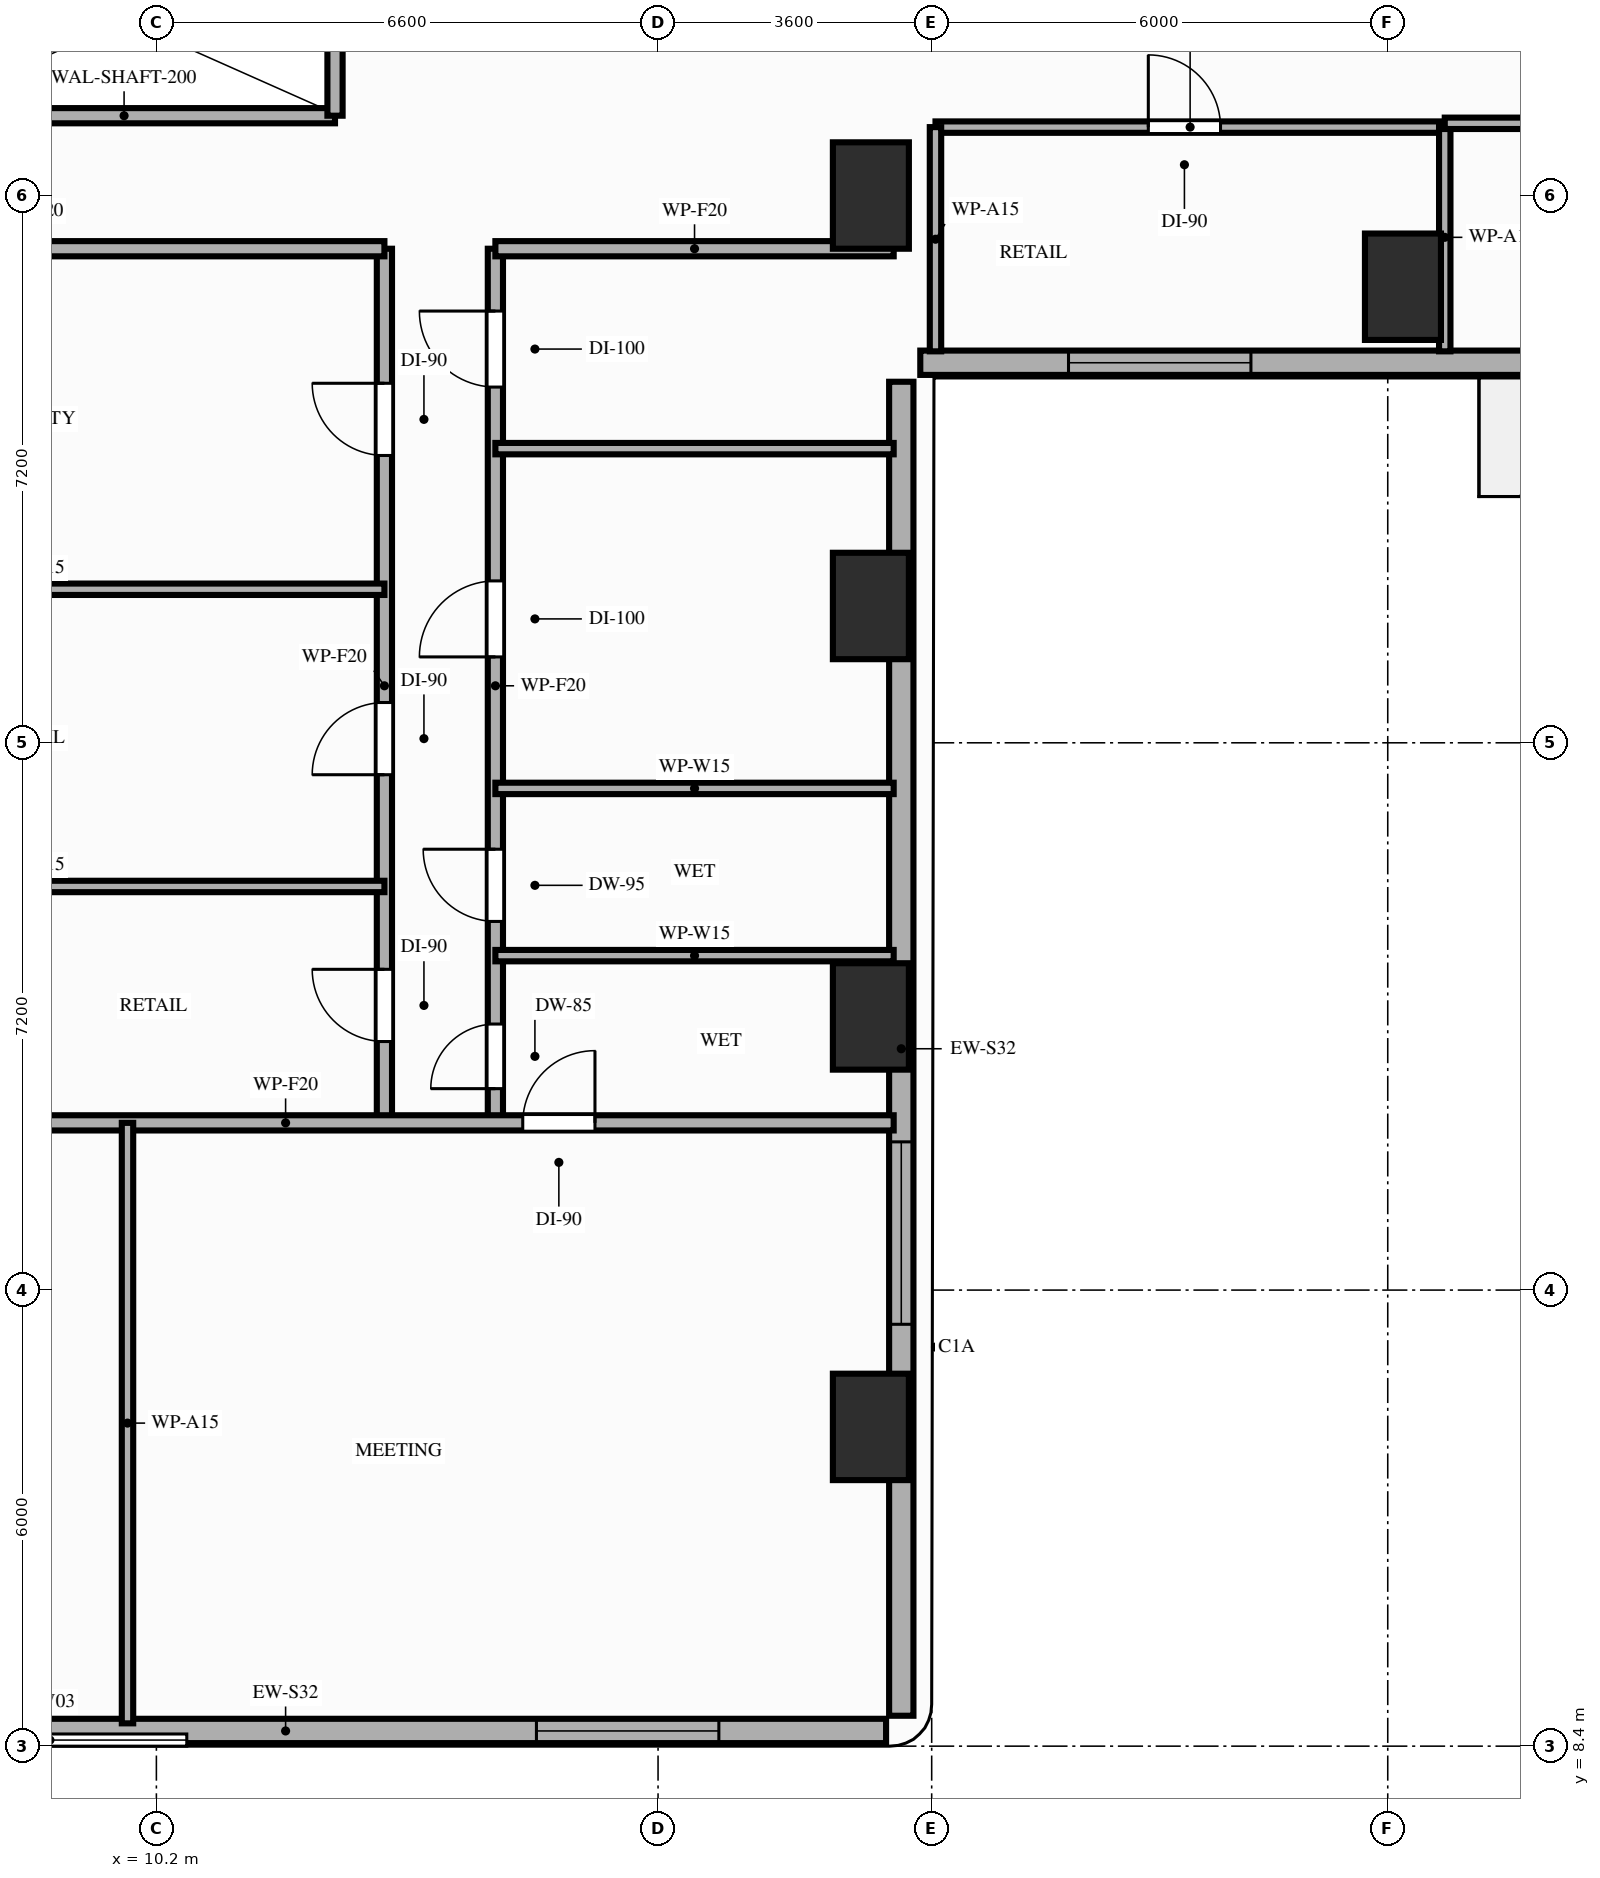
"""IFC4 building model, lengths in metres.
Left out: names, types, materials, properties, quantities, classifications, styles, units other than length and angle.
Written with IfcOpenShell. Run it as: python <this file> out.ifc"""

import sys

from ifc_helpers import new_model, si_unit, direction, frame, frame_2d, origin, origin_2d, place, context, subcontext, project, spatial, rectangle, extrude, element, fill, save


model = new_model("IFC4")
c1 = context("Model", 3, precision=1e-05, world=origin(), true_north=direction((0.0, 1.0)))
c2 = subcontext(c1, "Body", "Model", "MODEL_VIEW")
j1 = project(units=[si_unit("LENGTHUNIT", "METRE"), si_unit("PLANEANGLEUNIT", "RADIAN")], contexts=[c1])
p1 = place(None, origin())
s1 = spatial("IfcSite", under=j1, at=p1, CompositionType="ELEMENT")
p2 = place(p1, origin())
s2 = spatial("IfcBuilding", under=s1, at=p2, CompositionType="ELEMENT")
p3 = place(p2, frame((0.0, 0.0, 56.4)))
s3 = spatial("IfcBuildingStorey", under=s2, at=p3, CompositionType="ELEMENT", Elevation=56.4)
for number, where, z_axis, x_axis in (
    (1, (19.6, 12.6, 0.0), (0.0, 0.0, 1.0), (1.0, 0.0, 0.0)),
    (2, (19.6, 18.0, 0.0), (0.0, 0.0, 1.0), (1.0, 0.0, 0.0)),
    (3, (19.6, 23.4, 0.0), (0.0, 0.0, 1.0), (1.0, 0.0, 0.0)),
    (4, (19.6, 28.8, 0.0), (0.0, 0.0, 1.0), (1.0, 0.0, 0.0)),
    (5, (26.6, 27.6, 0.0), (0.0, 0.0, 1.0), (1.0, 0.0, 0.0)),
):
    element("IfcColumn", number, at=place(p3, frame(where, z_axis=z_axis, x_axis=x_axis)), inside=s3, PredefinedType="COLUMN", context=c2, shape_type="SweptSolid", body=[
        extrude(rectangle(XDim=1.0, YDim=1.4, at=origin_2d()), origin(), (0.0, 0.0, 1.0), 3.2),
    ])
p4 = place(p3, frame((4.0, 8.6, 0.0), z_axis=(0.0, 0.0, 1.0), x_axis=(1.0, 0.0, 0.0)))
e6 = element("IfcWall", 6, at=p4, inside=s3, PredefinedType="STANDARD", context=c2, shape_type="SweptSolid", body=[
    extrude(rectangle(XDim=15.8, YDim=0.32, at=frame_2d((7.9, 0.0))), origin(), (0.0, 0.0, 1.0), 3.02),
])
p5 = place(p4, frame((11.2, 0.0, 0.85)))
e7 = element("IfcOpeningElement", 7, at=p5, cuts=e6, PredefinedType="OPENING", context=c2, shape_type="SweptSolid", body=[
    extrude(rectangle(XDim=2.4, YDim=1.8, at=frame_2d((1.2, 0.9))), frame((0.0, 0.17, 0.0), z_axis=(0.0, -1.0, 0.0), x_axis=(1.0, 0.0, 0.0)), (0.0, 0.0, 1.0), 0.34),
])
p6 = place(p3, frame((20.0, 8.8, 0.0), z_axis=(0.0, 0.0, 1.0), x_axis=(0.0, 1.0, 0.0)))
e8 = element("IfcWall", 8, at=p6, inside=s3, PredefinedType="STANDARD", context=c2, shape_type="SweptSolid", body=[
    extrude(rectangle(XDim=17.55, YDim=0.32, at=frame_2d((8.775, 0.0))), origin(), (0.0, 0.0, 1.0), 2.4),
])
p7 = place(p6, frame((5.15, 0.0, 0.85)))
e9 = element("IfcOpeningElement", 9, at=p7, cuts=e8, PredefinedType="OPENING", context=c2, shape_type="SweptSolid", body=[
    extrude(rectangle(XDim=2.4, YDim=1.3, at=frame_2d((1.2, 0.65))), frame((0.0, 0.17, 0.0), z_axis=(0.0, -1.0, 0.0), x_axis=(1.0, 0.0, 0.0)), (0.0, 0.0, 1.0), 0.34),
])
p8 = place(p3, frame((20.25, 26.6, 0.0), z_axis=(0.0, 0.0, 1.0), x_axis=(1.0, 0.0, 0.0)))
e10 = element("IfcWall", 10, at=p8, inside=s3, PredefinedType="STANDARD", context=c2, shape_type="SweptSolid", body=[
    extrude(rectangle(XDim=26.15, YDim=0.32, at=frame_2d((13.075, 0.0))), origin(), (0.0, 0.0, 1.0), 3.02),
])
p9 = place(p8, frame((8.0, 0.0, 0.0)))
e11 = element("IfcOpeningElement", 11, at=p9, cuts=e10, PredefinedType="OPENING", context=c2, shape_type="SweptSolid", body=[
    extrude(rectangle(XDim=1.3, YDim=2.08, at=frame_2d((0.65, 1.04))), frame((0.0, 0.17, 0.0), z_axis=(0.0, -1.0, 0.0), x_axis=(1.0, 0.0, 0.0)), (0.0, 0.0, 1.0), 0.34),
])
p10 = place(p8, frame((22.5, 0.0, 0.0)))
e12 = element("IfcOpeningElement", 12, at=p10, cuts=e10, PredefinedType="OPENING", context=c2, shape_type="SweptSolid", body=[
    extrude(rectangle(XDim=1.3, YDim=2.08, at=frame_2d((0.65, 1.04))), frame((0.0, 0.17, 0.0), z_axis=(0.0, -1.0, 0.0), x_axis=(1.0, 0.0, 0.0)), (0.0, 0.0, 1.0), 0.34),
])
p11 = place(p8, frame((1.95, 0.0, 0.85)))
e13 = element("IfcOpeningElement", 13, at=p11, cuts=e10, PredefinedType="OPENING", context=c2, shape_type="SweptSolid", body=[
    extrude(rectangle(XDim=2.4, YDim=1.8, at=frame_2d((1.2, 0.9))), frame((0.0, 0.17, 0.0), z_axis=(0.0, -1.0, 0.0), x_axis=(1.0, 0.0, 0.0)), (0.0, 0.0, 1.0), 0.34),
])
p12 = place(p3, frame((7.0, 29.85, 0.0), z_axis=(0.0, 0.0, 1.0), x_axis=(1.0, 0.0, 0.0)))
e14 = element("IfcWall", 14, at=p12, inside=s3, PredefinedType="MOVABLE", context=c2, shape_type="SweptSolid", body=[
    extrude(rectangle(XDim=5.55, YDim=0.2, at=frame_2d((2.775, 0.0))), origin(), (0.0, 0.0, 1.0), 3.02),
])
p13 = place(p3, frame((12.55, 29.85, 0.0), z_axis=(0.0, 0.0, 1.0), x_axis=(0.0, 1.0, 0.0)))
e15 = element("IfcWall", 15, at=p13, inside=s3, PredefinedType="MOVABLE", context=c2, shape_type="SweptSolid", body=[
    extrude(rectangle(XDim=2.5, YDim=0.2, at=frame_2d((1.25, 0.0))), origin(), (0.0, 0.0, 1.0), 3.02),
])
p14 = place(p3, frame((13.2, 16.6, 0.0), z_axis=(0.0, 0.0, 1.0), x_axis=(0.0, 1.0, 0.0)))
e16 = element("IfcWall", 16, at=p14, inside=s3, PredefinedType="PARTITIONING", context=c2, shape_type="SweptSolid", body=[
    extrude(rectangle(XDim=11.5, YDim=0.2, at=frame_2d((5.75, 0.0))), origin(), (0.0, 0.0, 1.0), 2.4),
])
p15 = place(p14, frame((1.07, 0.0, 0.0)))
e17 = element("IfcOpeningElement", 17, at=p15, cuts=e16, PredefinedType="OPENING", context=c2, shape_type="SweptSolid", body=[
    extrude(rectangle(XDim=0.95, YDim=2.15, at=frame_2d((0.475, 1.075))), frame((0.0, 0.11, 0.0), z_axis=(0.0, -1.0, 0.0), x_axis=(1.0, 0.0, 0.0)), (0.0, 0.0, 1.0), 0.22),
])
p16 = place(p14, frame((4.58, 0.0, 0.0)))
e18 = element("IfcOpeningElement", 18, at=p16, cuts=e16, PredefinedType="OPENING", context=c2, shape_type="SweptSolid", body=[
    extrude(rectangle(XDim=0.95, YDim=2.15, at=frame_2d((0.475, 1.075))), frame((0.0, 0.11, 0.0), z_axis=(0.0, -1.0, 0.0), x_axis=(1.0, 0.0, 0.0)), (0.0, 0.0, 1.0), 0.22),
])
p17 = place(p14, frame((8.78, 0.0, 0.0)))
e19 = element("IfcOpeningElement", 19, at=p17, cuts=e16, PredefinedType="OPENING", context=c2, shape_type="SweptSolid", body=[
    extrude(rectangle(XDim=0.95, YDim=2.15, at=frame_2d((0.475, 1.075))), frame((0.0, 0.11, 0.0), z_axis=(0.0, -1.0, 0.0), x_axis=(1.0, 0.0, 0.0)), (0.0, 0.0, 1.0), 0.22),
])
p18 = place(p3, frame((14.66, 16.6, 0.0), z_axis=(0.0, 0.0, 1.0), x_axis=(0.0, 1.0, 0.0)))
e20 = element("IfcWall", 20, at=p18, inside=s3, PredefinedType="PARTITIONING", context=c2, shape_type="SweptSolid", body=[
    extrude(rectangle(XDim=11.5, YDim=0.2, at=frame_2d((5.75, 0.0))), origin(), (0.0, 0.0, 1.0), 2.4),
])
p19 = place(p18, frame((0.45, 0.0, 0.0)))
e21 = element("IfcOpeningElement", 21, at=p19, cuts=e20, PredefinedType="OPENING", context=c2, shape_type="SweptSolid", body=[
    extrude(rectangle(XDim=0.85, YDim=2.1, at=frame_2d((0.425, 1.05))), frame((0.0, 0.11, 0.0), z_axis=(0.0, -1.0, 0.0), x_axis=(1.0, 0.0, 0.0)), (0.0, 0.0, 1.0), 0.22),
])
p20 = place(p18, frame((2.65, 0.0, 0.0)))
e22 = element("IfcOpeningElement", 22, at=p20, cuts=e20, PredefinedType="OPENING", context=c2, shape_type="SweptSolid", body=[
    extrude(rectangle(XDim=0.95, YDim=2.1, at=frame_2d((0.475, 1.05))), frame((0.0, 0.11, 0.0), z_axis=(0.0, -1.0, 0.0), x_axis=(1.0, 0.0, 0.0)), (0.0, 0.0, 1.0), 0.22),
])
p21 = place(p18, frame((6.13, 0.0, 0.0)))
e23 = element("IfcOpeningElement", 23, at=p21, cuts=e20, PredefinedType="OPENING", context=c2, shape_type="SweptSolid", body=[
    extrude(rectangle(XDim=1.0, YDim=2.15, at=frame_2d((0.5, 1.075))), frame((0.0, 0.11, 0.0), z_axis=(0.0, -1.0, 0.0), x_axis=(1.0, 0.0, 0.0)), (0.0, 0.0, 1.0), 0.22),
])
p22 = place(p18, frame((9.68, 0.0, 0.0)))
e24 = element("IfcOpeningElement", 24, at=p22, cuts=e20, PredefinedType="OPENING", context=c2, shape_type="SweptSolid", body=[
    extrude(rectangle(XDim=1.0, YDim=2.15, at=frame_2d((0.5, 1.075))), frame((0.0, 0.11, 0.0), z_axis=(0.0, -1.0, 0.0), x_axis=(1.0, 0.0, 0.0)), (0.0, 0.0, 1.0), 0.22),
])
p23 = place(p3, frame((3.9, 16.6, 0.0), z_axis=(0.0, 0.0, 1.0), x_axis=(1.0, 0.0, 0.0)))
e25 = element("IfcWall", 25, at=p23, inside=s3, PredefinedType="PARTITIONING", context=c2, shape_type="SweptSolid", body=[
    extrude(rectangle(XDim=16.0, YDim=0.2, at=frame_2d((8.0, 0.0))), origin(), (0.0, 0.0, 1.0), 2.4),
])
p24 = place(p23, frame((2.72, 0.0, 0.0)))
e26 = element("IfcOpeningElement", 26, at=p24, cuts=e25, PredefinedType="OPENING", context=c2, shape_type="SweptSolid", body=[
    extrude(rectangle(XDim=0.95, YDim=2.15, at=frame_2d((0.475, 1.075))), frame((0.0, 0.11, 0.0), z_axis=(0.0, -1.0, 0.0), x_axis=(1.0, 0.0, 0.0)), (0.0, 0.0, 1.0), 0.22),
])
p25 = place(p23, frame((11.12, 0.0, 0.0)))
e27 = element("IfcOpeningElement", 27, at=p25, cuts=e25, PredefinedType="OPENING", context=c2, shape_type="SweptSolid", body=[
    extrude(rectangle(XDim=0.95, YDim=2.15, at=frame_2d((0.475, 1.075))), frame((0.0, 0.11, 0.0), z_axis=(0.0, -1.0, 0.0), x_axis=(1.0, 0.0, 0.0)), (0.0, 0.0, 1.0), 0.22),
])
p26 = place(p3, frame((3.9, 28.1, 0.0), z_axis=(0.0, 0.0, 1.0), x_axis=(1.0, 0.0, 0.0)))
e28 = element("IfcWall", 28, at=p26, inside=s3, PredefinedType="PARTITIONING", context=c2, shape_type="SweptSolid", body=[
    extrude(rectangle(XDim=9.3, YDim=0.2, at=frame_2d((4.65, 0.0))), origin(), (0.0, 0.0, 1.0), 2.4),
])
p27 = place(p3, frame((14.66, 28.1, 0.0), z_axis=(0.0, 0.0, 1.0), x_axis=(1.0, 0.0, 0.0)))
e29 = element("IfcWall", 29, at=p27, inside=s3, PredefinedType="PARTITIONING", context=c2, shape_type="SweptSolid", body=[
    extrude(rectangle(XDim=5.24, YDim=0.2, at=frame_2d((2.62, 0.0))), origin(), (0.0, 0.0, 1.0), 2.4),
])
p28 = place(p3, frame((20.45, 29.7, 0.0), z_axis=(0.0, 0.0, 1.0), x_axis=(1.0, 0.0, 0.0)))
e30 = element("IfcWall", 30, at=p28, inside=s3, PredefinedType="PARTITIONING", context=c2, shape_type="SweptSolid", body=[
    extrude(rectangle(XDim=6.7, YDim=0.15, at=frame_2d((3.35, 0.0))), origin(), (0.0, 0.0, 1.0), 3.02),
])
p29 = place(p28, frame((2.8, 0.0, 0.0)))
e31 = element("IfcOpeningElement", 31, at=p29, cuts=e30, PredefinedType="OPENING", context=c2, shape_type="SweptSolid", body=[
    extrude(rectangle(XDim=0.95, YDim=2.15, at=frame_2d((0.475, 1.075))), frame((0.0, 0.085, 0.0), z_axis=(0.0, -1.0, 0.0), x_axis=(1.0, 0.0, 0.0)), (0.0, 0.0, 1.0), 0.17),
])
p30 = place(p3, frame((20.45, 26.75, 0.0), z_axis=(0.0, 0.0, 1.0), x_axis=(0.0, 1.0, 0.0)))
e32 = element("IfcWall", 32, at=p30, inside=s3, PredefinedType="PARTITIONING", context=c2, shape_type="SweptSolid", body=[
    extrude(rectangle(XDim=2.95, YDim=0.15, at=frame_2d((1.475, 0.0))), origin(), (0.0, 0.0, 1.0), 2.4),
])
p31 = place(p3, frame((27.15, 26.75, 0.0), z_axis=(0.0, 0.0, 1.0), x_axis=(0.0, 1.0, 0.0)))
e33 = element("IfcWall", 33, at=p31, inside=s3, PredefinedType="PARTITIONING", context=c2, shape_type="SweptSolid", body=[
    extrude(rectangle(XDim=3.0, YDim=0.15, at=frame_2d((1.5, 0.0))), origin(), (0.0, 0.0, 1.0), 2.4),
])
for number, where, z_axis, x_axis in (
    (34, (3.9, 19.71, 0.0), (0.0, 0.0, 1.0), (1.0, 0.0, 0.0)),
    (35, (3.9, 23.62, 0.0), (0.0, 0.0, 1.0), (1.0, 0.0, 0.0)),
):
    element("IfcWall", number, at=place(p3, frame(where, z_axis=z_axis, x_axis=x_axis)), inside=s3, PredefinedType="PARTITIONING", context=c2, shape_type="SweptSolid", body=[
        extrude(rectangle(XDim=9.3, YDim=0.15, at=frame_2d((4.65, 0.0))), origin(), (0.0, 0.0, 1.0), 2.4),
    ])
p32 = place(p3, frame((9.82, 8.7, 0.0), z_axis=(0.0, 0.0, 1.0), x_axis=(0.0, 1.0, 0.0)))
e36 = element("IfcWall", 36, at=p32, inside=s3, PredefinedType="PARTITIONING", context=c2, shape_type="SweptSolid", body=[
    extrude(rectangle(XDim=7.9, YDim=0.15, at=frame_2d((3.95, 0.0))), origin(), (0.0, 0.0, 1.0), 2.4),
])
for number, where, z_axis, x_axis in (
    (37, (14.66, 18.8, 0.0), (0.0, 0.0, 1.0), (1.0, 0.0, 0.0)),
    (38, (14.66, 21.0, 0.0), (0.0, 0.0, 1.0), (1.0, 0.0, 0.0)),
    (39, (14.66, 25.47, 0.0), (0.0, 0.0, 1.0), (1.0, 0.0, 0.0)),
):
    element("IfcWall", number, at=place(p3, frame(where, z_axis=z_axis, x_axis=x_axis)), inside=s3, PredefinedType="PARTITIONING", context=c2, shape_type="SweptSolid", body=[
        extrude(rectangle(XDim=5.24, YDim=0.15, at=frame_2d((2.62, 0.0))), origin(), (0.0, 0.0, 1.0), 2.4),
    ])
p33 = place(p3, frame((27.15, 29.75, 0.0), z_axis=(0.0, 0.0, 1.0), x_axis=(1.0, 0.0, 0.0)))
e40 = element("IfcWall", 40, at=p33, inside=s3, PredefinedType="PARTITIONING", context=c2, shape_type="SweptSolid", body=[
    extrude(rectangle(XDim=14.65, YDim=0.15, at=frame_2d((7.325, 0.0))), origin(), (0.0, 0.0, 1.0), 2.4),
])
p34 = place(p33, frame((6.84, 0.0, 0.0)))
e41 = element("IfcOpeningElement", 41, at=p34, cuts=e40, PredefinedType="OPENING", context=c2, shape_type="SweptSolid", body=[
    extrude(rectangle(XDim=0.95, YDim=2.15, at=frame_2d((0.475, 1.075))), frame((0.0, 0.085, 0.0), z_axis=(0.0, -1.0, 0.0), x_axis=(1.0, 0.0, 0.0)), (0.0, 0.0, 1.0), 0.17),
])
p35 = place(p7, origin())
e42 = element("IfcWindow", 42, at=p35, inside=s3, PartitioningType="SINGLE_PANEL", PredefinedType="WINDOW", context=c2, shape_type="SweptSolid", body=[
    extrude(rectangle(XDim=2.4, YDim=1.3, at=frame_2d((1.2, 0.65))), frame((0.0, 0.03, 0.0), z_axis=(0.0, -1.0, 0.0), x_axis=(1.0, 0.0, 0.0)), (0.0, 0.0, 1.0), 0.06),
])
fill(e9, e42)
p36 = place(p5, origin())
e43 = element("IfcWindow", 43, at=p36, inside=s3, PartitioningType="SINGLE_PANEL", PredefinedType="WINDOW", context=c2, shape_type="SweptSolid", body=[
    extrude(rectangle(XDim=2.4, YDim=1.8, at=frame_2d((1.2, 0.9))), frame((0.0, 0.03, 0.0), z_axis=(0.0, -1.0, 0.0), x_axis=(1.0, 0.0, 0.0)), (0.0, 0.0, 1.0), 0.06),
])
fill(e7, e43)
p37 = place(p11, origin())
e44 = element("IfcWindow", 44, at=p37, inside=s3, PartitioningType="SINGLE_PANEL", PredefinedType="WINDOW", context=c2, shape_type="SweptSolid", body=[
    extrude(rectangle(XDim=2.4, YDim=1.8, at=frame_2d((1.2, 0.9))), frame((0.0, 0.03, 0.0), z_axis=(0.0, -1.0, 0.0), x_axis=(1.0, 0.0, 0.0)), (0.0, 0.0, 1.0), 0.06),
])
fill(e13, e44)
p38 = place(p29, origin())
e45 = element("IfcDoor", 45, at=p38, inside=s3, OperationType="SINGLE_SWING_LEFT", PredefinedType="DOOR", context=c2, shape_type="SweptSolid", body=[
    extrude(rectangle(XDim=0.95, YDim=2.15, at=frame_2d((0.475, 1.075))), frame((0.0, 0.025, 0.0), z_axis=(0.0, -1.0, 0.0), x_axis=(1.0, 0.0, 0.0)), (0.0, 0.0, 1.0), 0.05),
])
fill(e31, e45)
p39 = place(p15, origin())
e46 = element("IfcDoor", 46, at=p39, inside=s3, OperationType="SINGLE_SWING_RIGHT", PredefinedType="DOOR", context=c2, shape_type="SweptSolid", body=[
    extrude(rectangle(XDim=0.95, YDim=2.15, at=frame_2d((0.475, 1.075))), frame((0.0, 0.025, 0.0), z_axis=(0.0, -1.0, 0.0), x_axis=(1.0, 0.0, 0.0)), (0.0, 0.0, 1.0), 0.05),
])
fill(e17, e46)
p40 = place(p16, origin())
e47 = element("IfcDoor", 47, at=p40, inside=s3, OperationType="SINGLE_SWING_LEFT", PredefinedType="DOOR", context=c2, shape_type="SweptSolid", body=[
    extrude(rectangle(XDim=0.95, YDim=2.15, at=frame_2d((0.475, 1.075))), frame((0.0, 0.025, 0.0), z_axis=(0.0, -1.0, 0.0), x_axis=(1.0, 0.0, 0.0)), (0.0, 0.0, 1.0), 0.05),
])
fill(e18, e47)
p41 = place(p17, origin())
e48 = element("IfcDoor", 48, at=p41, inside=s3, OperationType="SINGLE_SWING_RIGHT", PredefinedType="DOOR", context=c2, shape_type="SweptSolid", body=[
    extrude(rectangle(XDim=0.95, YDim=2.15, at=frame_2d((0.475, 1.075))), frame((0.0, 0.025, 0.0), z_axis=(0.0, -1.0, 0.0), x_axis=(1.0, 0.0, 0.0)), (0.0, 0.0, 1.0), 0.05),
])
fill(e19, e48)
p42 = place(p25, origin())
e49 = element("IfcDoor", 49, at=p42, inside=s3, OperationType="SINGLE_SWING_RIGHT", PredefinedType="DOOR", context=c2, shape_type="SweptSolid", body=[
    extrude(rectangle(XDim=0.95, YDim=2.15, at=frame_2d((0.475, 1.075))), frame((0.0, 0.025, 0.0), z_axis=(0.0, -1.0, 0.0), x_axis=(1.0, 0.0, 0.0)), (0.0, 0.0, 1.0), 0.05),
])
fill(e27, e49)
p43 = place(p19, origin())
e50 = element("IfcDoor", 50, at=p43, inside=s3, OperationType="SINGLE_SWING_LEFT", PredefinedType="DOOR", context=c2, shape_type="SweptSolid", body=[
    extrude(rectangle(XDim=0.85, YDim=2.1, at=frame_2d((0.425, 1.05))), frame((0.0, 0.025, 0.0), z_axis=(0.0, -1.0, 0.0), x_axis=(1.0, 0.0, 0.0)), (0.0, 0.0, 1.0), 0.05),
])
fill(e21, e50)
p44 = place(p20, origin())
e51 = element("IfcDoor", 51, at=p44, inside=s3, OperationType="SINGLE_SWING_RIGHT", PredefinedType="DOOR", context=c2, shape_type="SweptSolid", body=[
    extrude(rectangle(XDim=0.95, YDim=2.1, at=frame_2d((0.475, 1.05))), frame((0.0, 0.025, 0.0), z_axis=(0.0, -1.0, 0.0), x_axis=(1.0, 0.0, 0.0)), (0.0, 0.0, 1.0), 0.05),
])
fill(e22, e51)
p45 = place(p21, origin())
e52 = element("IfcDoor", 52, at=p45, inside=s3, OperationType="SINGLE_SWING_LEFT", PredefinedType="DOOR", context=c2, shape_type="SweptSolid", body=[
    extrude(rectangle(XDim=1.0, YDim=2.15, at=frame_2d((0.5, 1.075))), frame((0.0, 0.025, 0.0), z_axis=(0.0, -1.0, 0.0), x_axis=(1.0, 0.0, 0.0)), (0.0, 0.0, 1.0), 0.05),
])
fill(e23, e52)
p46 = place(p22, origin())
e53 = element("IfcDoor", 53, at=p46, inside=s3, OperationType="SINGLE_SWING_RIGHT", PredefinedType="DOOR", context=c2, shape_type="SweptSolid", body=[
    extrude(rectangle(XDim=1.0, YDim=2.15, at=frame_2d((0.5, 1.075))), frame((0.0, 0.025, 0.0), z_axis=(0.0, -1.0, 0.0), x_axis=(1.0, 0.0, 0.0)), (0.0, 0.0, 1.0), 0.05),
])
fill(e24, e53)
save(model, sys.argv[1])
